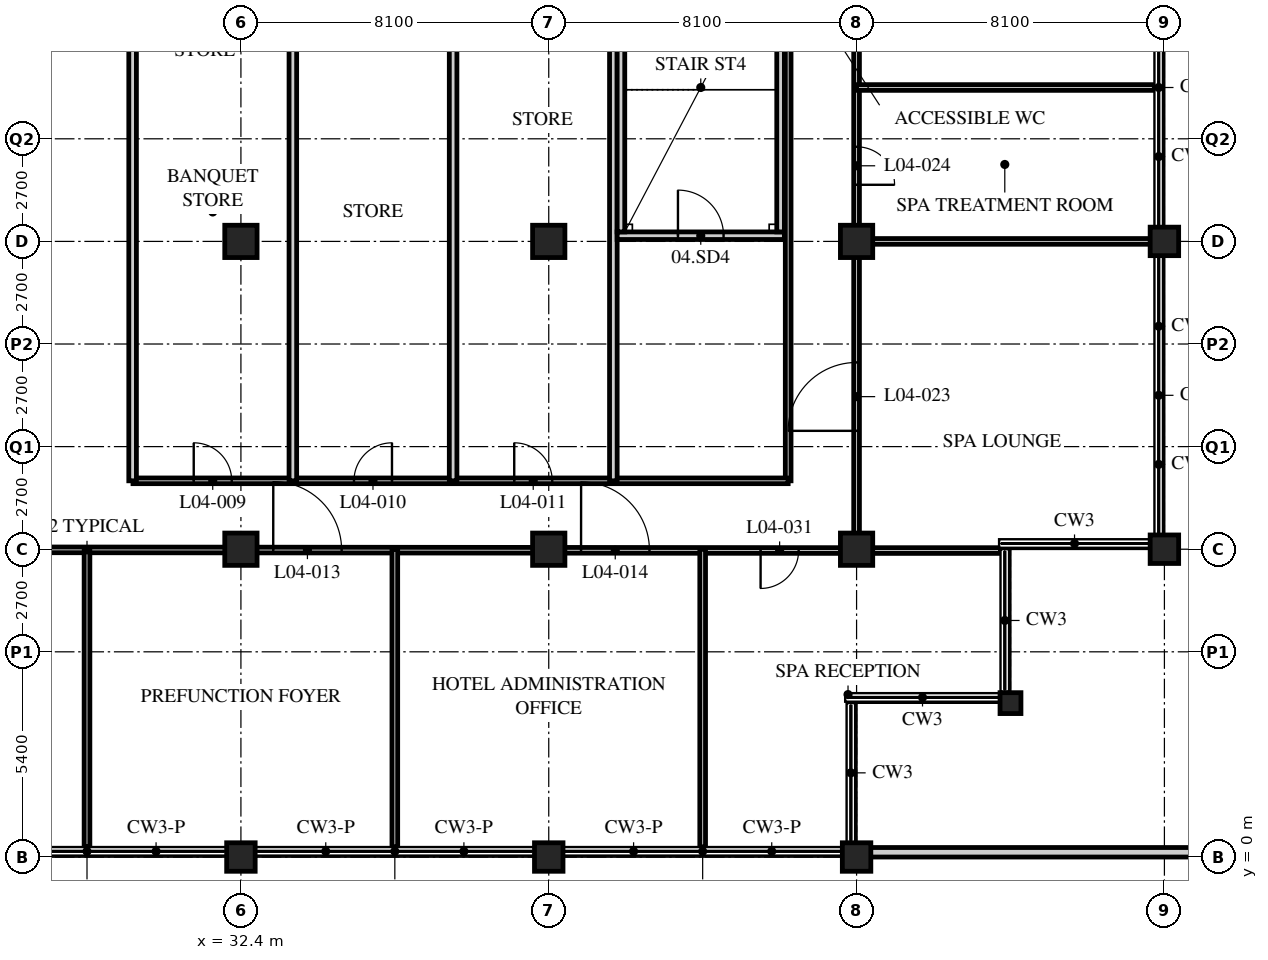
"""IFC4 building model, lengths in metres.
Left out: names, types, materials, properties, quantities, classifications, styles, units other than length and angle.
Written with IfcOpenShell. Run it as: python <this file> out.ifc"""

import sys

from ifc_helpers import new_model, si_unit, direction, frame, frame_2d, origin, origin_2d, place, context, subcontext, project, spatial, rectangle, hollow_rectangle, extrude, element, fill, save


model = new_model("IFC4")
c1 = context("Model", 3, precision=1e-05, world=origin(), true_north=direction((0.0, 1.0)))
c2 = subcontext(c1, "Body", "Model", "MODEL_VIEW")
j1 = project(units=[si_unit("LENGTHUNIT", "METRE"), si_unit("PLANEANGLEUNIT", "RADIAN")], contexts=[c1])
p1 = place(None, origin())
s1 = spatial("IfcSite", under=j1, at=p1, CompositionType="ELEMENT")
p2 = place(p1, origin())
s2 = spatial("IfcBuilding", under=s1, at=p2, CompositionType="ELEMENT")
p3 = place(p2, frame((0.0, 0.0, 22.2)))
s3 = spatial("IfcBuildingStorey", under=s2, at=p3, CompositionType="ELEMENT", Elevation=22.2)
p4 = place(p3, frame((32.4, 0.0, 0.0), z_axis=(0.0, 0.0, 1.0), x_axis=(1.0, 0.0, 0.0)))
e1 = element("IfcColumn", 1, at=p4, inside=s3, PredefinedType="COLUMN", context=c2, shape_type="SweptSolid", body=[
    extrude(hollow_rectangle(XDim=0.75, YDim=0.75, WallThickness=0.07, at=origin_2d()), origin(), (0.0, 0.0, 1.0), 5.4),
])
for number, where, z_axis, x_axis in (
    (2, (32.4, 8.1, 0.0), (0.0, 0.0, 1.0), (1.0, 0.0, 0.0)),
    (3, (32.4, 16.2, 0.0), (0.0, 0.0, 1.0), (1.0, 0.0, 0.0)),
):
    element("IfcColumn", number, at=place(p3, frame(where, z_axis=z_axis, x_axis=x_axis)), inside=s3, PredefinedType="COLUMN", context=c2, shape_type="SweptSolid", body=[
        extrude(hollow_rectangle(XDim=0.85, YDim=0.85, WallThickness=0.085, at=origin_2d()), origin(), (0.0, 0.0, 1.0), 5.4),
    ])
p5 = place(p3, frame((40.5, 0.0, 0.0), z_axis=(0.0, 0.0, 1.0), x_axis=(1.0, 0.0, 0.0)))
e4 = element("IfcColumn", 4, at=p5, inside=s3, PredefinedType="COLUMN", context=c2, shape_type="SweptSolid", body=[
    extrude(hollow_rectangle(XDim=0.75, YDim=0.75, WallThickness=0.07, at=origin_2d()), origin(), (0.0, 0.0, 1.0), 5.4),
])
for number, where, z_axis, x_axis in (
    (5, (40.5, 8.1, 0.0), (0.0, 0.0, 1.0), (1.0, 0.0, 0.0)),
    (6, (40.5, 16.2, 0.0), (0.0, 0.0, 1.0), (1.0, 0.0, 0.0)),
):
    element("IfcColumn", number, at=place(p3, frame(where, z_axis=z_axis, x_axis=x_axis)), inside=s3, PredefinedType="COLUMN", context=c2, shape_type="SweptSolid", body=[
        extrude(hollow_rectangle(XDim=0.85, YDim=0.85, WallThickness=0.085, at=origin_2d()), origin(), (0.0, 0.0, 1.0), 5.4),
    ])
p6 = place(p3, frame((48.6, 0.0, 0.0), z_axis=(0.0, 0.0, 1.0), x_axis=(1.0, 0.0, 0.0)))
e7 = element("IfcColumn", 7, at=p6, inside=s3, PredefinedType="COLUMN", context=c2, shape_type="SweptSolid", body=[
    extrude(hollow_rectangle(XDim=0.75, YDim=0.75, WallThickness=0.07, at=origin_2d()), origin(), (0.0, 0.0, 1.0), 5.4),
])
for number, where, z_axis, x_axis in (
    (8, (48.6, 8.1, 0.0), (0.0, 0.0, 1.0), (1.0, 0.0, 0.0)),
    (9, (48.6, 16.2, 0.0), (0.0, 0.0, 1.0), (1.0, 0.0, 0.0)),
):
    element("IfcColumn", number, at=place(p3, frame(where, z_axis=z_axis, x_axis=x_axis)), inside=s3, PredefinedType="COLUMN", context=c2, shape_type="SweptSolid", body=[
        extrude(hollow_rectangle(XDim=0.85, YDim=0.85, WallThickness=0.085, at=origin_2d()), origin(), (0.0, 0.0, 1.0), 5.4),
    ])
p7 = place(p3, frame((52.65, 4.05, 0.0), z_axis=(0.0, 0.0, 1.0), x_axis=(1.0, 0.0, 0.0)))
e10 = element("IfcColumn", 10, at=p7, inside=s3, PredefinedType="COLUMN", context=c2, shape_type="SweptSolid", body=[
    extrude(hollow_rectangle(XDim=0.55, YDim=0.55, WallThickness=0.05, at=origin_2d()), origin(), (0.0, 0.0, 1.0), 5.4),
])
for number, where, z_axis, x_axis in (
    (11, (56.7, 8.1, 0.0), (0.0, 0.0, 1.0), (1.0, 0.0, 0.0)),
    (12, (56.7, 16.2, 0.0), (0.0, 0.0, 1.0), (1.0, 0.0, 0.0)),
):
    element("IfcColumn", number, at=place(p3, frame(where, z_axis=z_axis, x_axis=x_axis)), inside=s3, PredefinedType="COLUMN", context=c2, shape_type="SweptSolid", body=[
        extrude(hollow_rectangle(XDim=0.75, YDim=0.75, WallThickness=0.07, at=origin_2d()), origin(), (0.0, 0.0, 1.0), 5.4),
    ])
p8 = place(p3, frame((48.6, 0.125, 0.0), z_axis=(0.0, 0.0, 1.0), x_axis=(1.0, 0.0, 0.0)))
e13 = element("IfcWall", 13, at=p8, inside=s3, PredefinedType="PARAPET", context=c2, shape_type="SweptSolid", body=[
    extrude(rectangle(XDim=16.2, YDim=0.25, at=frame_2d((8.1, 0.0))), origin(), (0.0, 0.0, 1.0), 1.38),
])
p9 = place(p3, frame((8.1, 8.1, 0.0), z_axis=(0.0, 0.0, 1.0), x_axis=(0.99999962324, -0.000868055229, 0.0)))
e14 = element("IfcWall", 14, at=p9, inside=s3, PredefinedType="PARTITIONING", context=c2, shape_type="SweptSolid", body=[
    extrude(rectangle(XDim=40.5, YDim=0.15, at=frame_2d((20.25, 0.0))), origin(), (0.0, 0.0, 1.0), 4.428),
])
p10 = place(p9, frame((11.25, 0.0, 0.0)))
e15 = element("IfcOpeningElement", 15, at=p10, cuts=e14, PredefinedType="OPENING", context=c2, shape_type="SweptSolid", body=[
    extrude(rectangle(XDim=1.8, YDim=2.4, at=frame_2d((0.9, 1.2))), frame((0.0, 0.085, 0.0), z_axis=(0.0, -1.0, 0.0), x_axis=(1.0, 0.0, 0.0)), (0.0, 0.0, 1.0), 0.17),
])
p11 = place(p9, frame((25.15, 0.0, 0.0)))
e16 = element("IfcOpeningElement", 16, at=p11, cuts=e14, PredefinedType="OPENING", context=c2, shape_type="SweptSolid", body=[
    extrude(rectangle(XDim=1.8, YDim=2.4, at=frame_2d((0.9, 1.2))), frame((0.0, 0.085, 0.0), z_axis=(0.0, -1.0, 0.0), x_axis=(1.0, 0.0, 0.0)), (0.0, 0.0, 1.0), 0.17),
])
p12 = place(p9, frame((33.25, 0.0, 0.0)))
e17 = element("IfcOpeningElement", 17, at=p12, cuts=e14, PredefinedType="OPENING", context=c2, shape_type="SweptSolid", body=[
    extrude(rectangle(XDim=1.8, YDim=2.4, at=frame_2d((0.9, 1.2))), frame((0.0, 0.085, 0.0), z_axis=(0.0, -1.0, 0.0), x_axis=(1.0, 0.0, 0.0)), (0.0, 0.0, 1.0), 0.17),
])
p13 = place(p9, frame((1.525, 0.0, 0.0)))
e18 = element("IfcOpeningElement", 18, at=p13, cuts=e14, PredefinedType="OPENING", context=c2, shape_type="SweptSolid", body=[
    extrude(rectangle(XDim=1.0, YDim=2.1, at=frame_2d((0.5, 1.05))), frame((0.0, 0.085, 0.0), z_axis=(0.0, -1.0, 0.0), x_axis=(1.0, 0.0, 0.0)), (0.0, 0.0, 1.0), 0.17),
])
p14 = place(p9, frame((37.975, 0.0, 0.0)))
e19 = element("IfcOpeningElement", 19, at=p14, cuts=e14, PredefinedType="OPENING", context=c2, shape_type="SweptSolid", body=[
    extrude(rectangle(XDim=1.0, YDim=2.1, at=frame_2d((0.5, 1.05))), frame((0.0, 0.085, 0.0), z_axis=(0.0, -1.0, 0.0), x_axis=(1.0, 0.0, 0.0)), (0.0, 0.0, 1.0), 0.17),
])
p15 = place(p3, frame((48.6, 8.065, 0.0), z_axis=(0.0, 0.0, 1.0), x_axis=(0.0, 1.0, 0.0)))
e20 = element("IfcWall", 20, at=p15, inside=s3, PredefinedType="PARTITIONING", context=c2, shape_type="SweptSolid", body=[
    extrude(rectangle(XDim=34.385, YDim=0.15, at=frame_2d((17.192, 0.0))), origin(), (0.0, 0.0, 1.0), 4.428),
])
p16 = place(p15, frame((3.15, 0.0, 0.0)))
e21 = element("IfcOpeningElement", 21, at=p16, cuts=e20, PredefinedType="OPENING", context=c2, shape_type="SweptSolid", body=[
    extrude(rectangle(XDim=1.8, YDim=2.4, at=frame_2d((0.9, 1.2))), frame((0.0, 0.085, 0.0), z_axis=(0.0, -1.0, 0.0), x_axis=(1.0, 0.0, 0.0)), (0.0, 0.0, 1.0), 0.17),
])
p17 = place(p15, frame((9.625, 0.0, 0.0)))
e22 = element("IfcOpeningElement", 22, at=p17, cuts=e20, PredefinedType="OPENING", context=c2, shape_type="SweptSolid", body=[
    extrude(rectangle(XDim=1.0, YDim=2.1, at=frame_2d((0.5, 1.05))), frame((0.0, 0.085, 0.0), z_axis=(0.0, -1.0, 0.0), x_axis=(1.0, 0.0, 0.0)), (0.0, 0.0, 1.0), 0.17),
])
p18 = place(p15, frame((13.675, 0.0, 0.0)))
e23 = element("IfcOpeningElement", 23, at=p18, cuts=e20, PredefinedType="OPENING", context=c2, shape_type="SweptSolid", body=[
    extrude(rectangle(XDim=1.0, YDim=2.1, at=frame_2d((0.5, 1.05))), frame((0.0, 0.085, 0.0), z_axis=(0.0, -1.0, 0.0), x_axis=(1.0, 0.0, 0.0)), (0.0, 0.0, 1.0), 0.17),
])
p19 = place(p15, frame((17.725, 0.0, 0.0)))
e24 = element("IfcOpeningElement", 24, at=p19, cuts=e20, PredefinedType="OPENING", context=c2, shape_type="SweptSolid", body=[
    extrude(rectangle(XDim=1.0, YDim=2.1, at=frame_2d((0.5, 1.05))), frame((0.0, 0.085, 0.0), z_axis=(0.0, -1.0, 0.0), x_axis=(1.0, 0.0, 0.0)), (0.0, 0.0, 1.0), 0.17),
])
p20 = place(p15, frame((21.775, 0.0, 0.0)))
e25 = element("IfcOpeningElement", 25, at=p20, cuts=e20, PredefinedType="OPENING", context=c2, shape_type="SweptSolid", body=[
    extrude(rectangle(XDim=1.0, YDim=2.1, at=frame_2d((0.5, 1.05))), frame((0.0, 0.085, 0.0), z_axis=(0.0, -1.0, 0.0), x_axis=(1.0, 0.0, 0.0)), (0.0, 0.0, 1.0), 0.17),
])
p21 = place(p15, frame((25.825, 0.0, 0.0)))
e26 = element("IfcOpeningElement", 26, at=p21, cuts=e20, PredefinedType="OPENING", context=c2, shape_type="SweptSolid", body=[
    extrude(rectangle(XDim=1.0, YDim=2.1, at=frame_2d((0.5, 1.05))), frame((0.0, 0.085, 0.0), z_axis=(0.0, -1.0, 0.0), x_axis=(1.0, 0.0, 0.0)), (0.0, 0.0, 1.0), 0.17),
])
p22 = place(p15, frame((30.6, 0.0, 0.0)))
e27 = element("IfcOpeningElement", 27, at=p22, cuts=e20, PredefinedType="OPENING", context=c2, shape_type="SweptSolid", body=[
    extrude(rectangle(XDim=1.0, YDim=2.1, at=frame_2d((0.5, 1.05))), frame((0.0, 0.085, 0.0), z_axis=(0.0, -1.0, 0.0), x_axis=(1.0, 0.0, 0.0)), (0.0, 0.0, 1.0), 0.17),
])
p23 = place(p3, frame((46.8, 9.9, 0.0), z_axis=(0.0, 0.0, 1.0), x_axis=(0.0, 1.0, 0.0)))
e28 = element("IfcWall", 28, at=p23, inside=s3, PredefinedType="PARTITIONING", context=c2, shape_type="SweptSolid", body=[
    extrude(rectangle(XDim=30.75, YDim=0.15, at=frame_2d((15.375, 0.0))), origin(), (0.0, 0.0, 1.0), 5.19),
])
p24 = place(p23, frame((15.175, 0.0, 0.0)))
e29 = element("IfcOpeningElement", 29, at=p24, cuts=e28, PredefinedType="OPENING", context=c2, shape_type="SweptSolid", body=[
    extrude(rectangle(XDim=0.85, YDim=2.1, at=frame_2d((0.425, 1.05))), frame((0.0, 0.085, 0.0), z_axis=(0.0, -1.0, 0.0), x_axis=(1.0, 0.0, 0.0)), (0.0, 0.0, 1.0), 0.17),
])
p25 = place(p23, frame((19.15, 0.0, 0.0)))
e30 = element("IfcOpeningElement", 30, at=p25, cuts=e28, PredefinedType="OPENING", context=c2, shape_type="SweptSolid", body=[
    extrude(rectangle(XDim=1.0, YDim=2.1, at=frame_2d((0.5, 1.05))), frame((0.0, 0.085, 0.0), z_axis=(0.0, -1.0, 0.0), x_axis=(1.0, 0.0, 0.0)), (0.0, 0.0, 1.0), 0.17),
])
p26 = place(p23, frame((26.05, 0.0, 0.0)))
e31 = element("IfcOpeningElement", 31, at=p26, cuts=e28, PredefinedType="OPENING", context=c2, shape_type="SweptSolid", body=[
    extrude(rectangle(XDim=1.0, YDim=2.1, at=frame_2d((0.5, 1.05))), frame((0.0, 0.085, 0.0), z_axis=(0.0, -1.0, 0.0), x_axis=(1.0, 0.0, 0.0)), (0.0, 0.0, 1.0), 0.17),
])
p27 = place(p3, frame((29.56, 9.9, 0.0), z_axis=(0.0, 0.0, 1.0), x_axis=(1.0, 0.0, 0.0)))
e32 = element("IfcWall", 32, at=p27, inside=s3, PredefinedType="PARTITIONING", context=c2, shape_type="SweptSolid", body=[
    extrude(rectangle(XDim=17.24, YDim=0.15, at=frame_2d((8.62, 0.0))), origin(), (0.0, 0.0, 1.0), 5.19),
])
p28 = place(p27, frame((1.598, 0.0, 0.0)))
e33 = element("IfcOpeningElement", 33, at=p28, cuts=e32, PredefinedType="OPENING", context=c2, shape_type="SweptSolid", body=[
    extrude(rectangle(XDim=1.0, YDim=2.1, at=frame_2d((0.5, 1.05))), frame((0.0, 0.085, 0.0), z_axis=(0.0, -1.0, 0.0), x_axis=(1.0, 0.0, 0.0)), (0.0, 0.0, 1.0), 0.17),
])
p29 = place(p27, frame((5.815, 0.0, 0.0)))
e34 = element("IfcOpeningElement", 34, at=p29, cuts=e32, PredefinedType="OPENING", context=c2, shape_type="SweptSolid", body=[
    extrude(rectangle(XDim=1.0, YDim=2.1, at=frame_2d((0.5, 1.05))), frame((0.0, 0.085, 0.0), z_axis=(0.0, -1.0, 0.0), x_axis=(1.0, 0.0, 0.0)), (0.0, 0.0, 1.0), 0.17),
])
p30 = place(p27, frame((10.032, 0.0, 0.0)))
e35 = element("IfcOpeningElement", 35, at=p30, cuts=e32, PredefinedType="OPENING", context=c2, shape_type="SweptSolid", body=[
    extrude(rectangle(XDim=1.0, YDim=2.1, at=frame_2d((0.5, 1.05))), frame((0.0, 0.085, 0.0), z_axis=(0.0, -1.0, 0.0), x_axis=(1.0, 0.0, 0.0)), (0.0, 0.0, 1.0), 0.17),
])
for number, where, z_axis, x_axis in (
    (36, (33.767, 9.9, 0.0), (0.0, 0.0, 1.0), (0.0, 1.0, 0.0)),
    (37, (37.983, 9.9, 0.0), (0.0, 0.0, 1.0), (0.0, 1.0, 0.0)),
    (38, (42.2, 9.9, 0.0), (0.0, 0.0, 1.0), (0.0, 1.0, 0.0)),
    (39, (29.55, 9.9, 0.0), (0.0, 0.0, 1.0), (0.0, 1.0, 0.0)),
):
    element("IfcWall", number, at=place(p3, frame(where, z_axis=z_axis, x_axis=x_axis)), inside=s3, PredefinedType="SOLIDWALL", context=c2, shape_type="SweptSolid", body=[
        extrude(rectangle(XDim=14.4, YDim=0.2, at=frame_2d((7.2, 0.0))), origin(), (0.0, 0.0, 1.0), 5.19),
    ])
for number, where, z_axis, x_axis in (
    (40, (28.35, 8.1, 0.0), (0.0, 0.0, 1.0), (0.0, -1.0, 0.0)),
    (41, (36.45, 8.1, 0.0), (0.0, 0.0, 1.0), (0.0, -1.0, 0.0)),
):
    element("IfcWall", number, at=place(p3, frame(where, z_axis=z_axis, x_axis=x_axis)), inside=s3, PredefinedType="PARTITIONING", context=c2, shape_type="SweptSolid", body=[
        extrude(rectangle(XDim=7.835, YDim=0.15, at=frame_2d((3.917, 0.0))), origin(), (0.0, 0.0, 1.0), 5.19),
    ])
p31 = place(p3, frame((48.6, 16.2, 0.0), z_axis=(0.0, 0.0, 1.0), x_axis=(1.0, 0.0, 0.0)))
e42 = element("IfcWall", 42, at=p31, inside=s3, PredefinedType="PARTITIONING", context=c2, shape_type="SweptSolid", body=[
    extrude(rectangle(XDim=7.8, YDim=0.15, at=frame_2d((3.9, 0.0))), origin(), (0.0, 0.0, 1.0), 4.428),
])
p32 = place(p3, frame((48.6, 20.25, 0.0), z_axis=(0.0, 0.0, 1.0), x_axis=(1.0, 0.0, 0.0)))
e43 = element("IfcWall", 43, at=p32, inside=s3, PredefinedType="PARTITIONING", context=c2, shape_type="SweptSolid", body=[
    extrude(rectangle(XDim=7.834, YDim=0.15, at=frame_2d((3.917, 0.0))), origin(), (0.0, 0.0, 1.0), 5.19),
])
p33 = place(p3, frame((48.6, 8.065, 0.0), z_axis=(0.0, 0.0, 1.0), x_axis=(1.0, 0.0, 0.0)))
e44 = element("IfcWall", 44, at=p33, inside=s3, PredefinedType="PARTITIONING", context=c2, shape_type="SweptSolid", body=[
    extrude(rectangle(XDim=3.784, YDim=0.15, at=frame_2d((1.892, 0.0))), origin(), (0.0, 0.0, 1.0), 4.428),
])
p34 = place(p3, frame((44.55, 8.1, 0.0), z_axis=(0.0, 0.0, 1.0), x_axis=(0.0, -1.0, 0.0)))
e45 = element("IfcWall", 45, at=p34, inside=s3, PredefinedType="PARTITIONING", context=c2, shape_type="SweptSolid", body=[
    extrude(rectangle(XDim=7.835, YDim=0.15, at=frame_2d((3.917, 0.0))), origin(), (0.0, 0.0, 1.0), 5.19),
])
p35 = place(p3, frame((42.3, 16.35, 0.0), z_axis=(0.0, 0.0, 1.0), x_axis=(1.0, 0.0, 0.0)))
e46 = element("IfcWall", 46, at=p35, inside=s3, PredefinedType="SOLIDWALL", context=c2, shape_type="SweptSolid", body=[
    extrude(rectangle(XDim=4.4, YDim=0.2, at=frame_2d((2.2, 0.0))), origin(), (0.0, 0.0, 1.0), 4.428),
])
p36 = place(p35, frame((1.6, 0.0, 0.0)))
e47 = element("IfcOpeningElement", 47, at=p36, cuts=e46, PredefinedType="OPENING", context=c2, shape_type="SweptSolid", body=[
    extrude(rectangle(XDim=1.2, YDim=2.1, at=frame_2d((0.6, 1.05))), frame((0.0, 0.11, 0.0), z_axis=(0.0, -1.0, 0.0), x_axis=(1.0, 0.0, 0.0)), (0.0, 0.0, 1.0), 0.22),
])
for number, where, z_axis, x_axis in (
    (48, (42.4, 16.45, 0.0), (0.0, 0.0, 1.0), (0.0, 1.0, 0.0)),
    (49, (46.6, 16.45, 0.0), (0.0, 0.0, 1.0), (0.0, 1.0, 0.0)),
):
    element("IfcWall", number, at=place(p3, frame(where, z_axis=z_axis, x_axis=x_axis)), inside=s3, PredefinedType="SOLIDWALL", context=c2, shape_type="SweptSolid", body=[
        extrude(rectangle(XDim=7.6, YDim=0.2, at=frame_2d((3.8, 0.0))), origin(), (0.0, 0.0, 1.0), 5.19),
    ])
p37 = place(p28, origin())
e50 = element("IfcDoor", 50, at=p37, inside=s3, OperationType="SINGLE_SWING_LEFT", PredefinedType="DOOR", context=c2, shape_type="SweptSolid", body=[
    extrude(rectangle(XDim=1.0, YDim=2.1, at=frame_2d((0.5, 1.05))), frame((0.0, 0.025, 0.0), z_axis=(0.0, -1.0, 0.0), x_axis=(1.0, 0.0, 0.0)), (0.0, 0.0, 1.0), 0.05),
])
fill(e33, e50)
p38 = place(p29, origin())
e51 = element("IfcDoor", 51, at=p38, inside=s3, OperationType="SINGLE_SWING_RIGHT", PredefinedType="DOOR", context=c2, shape_type="SweptSolid", body=[
    extrude(rectangle(XDim=1.0, YDim=2.1, at=frame_2d((0.5, 1.05))), frame((0.0, 0.025, 0.0), z_axis=(0.0, -1.0, 0.0), x_axis=(1.0, 0.0, 0.0)), (0.0, 0.0, 1.0), 0.05),
])
fill(e34, e51)
p39 = place(p30, origin())
e52 = element("IfcDoor", 52, at=p39, inside=s3, OperationType="SINGLE_SWING_LEFT", PredefinedType="DOOR", context=c2, shape_type="SweptSolid", body=[
    extrude(rectangle(XDim=1.0, YDim=2.1, at=frame_2d((0.5, 1.05))), frame((0.0, 0.025, 0.0), z_axis=(0.0, -1.0, 0.0), x_axis=(1.0, 0.0, 0.0)), (0.0, 0.0, 1.0), 0.05),
])
fill(e35, e52)
p40 = place(p11, origin())
e53 = element("IfcDoor", 53, at=p40, inside=s3, OperationType="DOUBLE_DOOR_SINGLE_SWING", PredefinedType="DOOR", context=c2, shape_type="SweptSolid", body=[
    extrude(rectangle(XDim=1.8, YDim=2.4, at=frame_2d((0.9, 1.2))), frame((0.0, 0.025, 0.0), z_axis=(0.0, -1.0, 0.0), x_axis=(1.0, 0.0, 0.0)), (0.0, 0.0, 1.0), 0.05),
])
fill(e16, e53)
p41 = place(p12, origin())
e54 = element("IfcDoor", 54, at=p41, inside=s3, OperationType="DOUBLE_DOOR_SINGLE_SWING", PredefinedType="DOOR", context=c2, shape_type="SweptSolid", body=[
    extrude(rectangle(XDim=1.8, YDim=2.4, at=frame_2d((0.9, 1.2))), frame((0.0, 0.025, 0.0), z_axis=(0.0, -1.0, 0.0), x_axis=(1.0, 0.0, 0.0)), (0.0, 0.0, 1.0), 0.05),
])
fill(e17, e54)
p42 = place(p16, origin())
e55 = element("IfcDoor", 55, at=p42, inside=s3, OperationType="DOUBLE_DOOR_SINGLE_SWING", PredefinedType="DOOR", context=c2, shape_type="SweptSolid", body=[
    extrude(rectangle(XDim=1.8, YDim=2.4, at=frame_2d((0.9, 1.2))), frame((0.0, 0.025, 0.0), z_axis=(0.0, -1.0, 0.0), x_axis=(1.0, 0.0, 0.0)), (0.0, 0.0, 1.0), 0.05),
])
fill(e21, e55)
p43 = place(p17, origin())
e56 = element("IfcDoor", 56, at=p43, inside=s3, OperationType="SINGLE_SWING_RIGHT", PredefinedType="DOOR", context=c2, shape_type="SweptSolid", body=[
    extrude(rectangle(XDim=1.0, YDim=2.1, at=frame_2d((0.5, 1.05))), frame((0.0, 0.025, 0.0), z_axis=(0.0, -1.0, 0.0), x_axis=(1.0, 0.0, 0.0)), (0.0, 0.0, 1.0), 0.05),
])
fill(e22, e56)
p44 = place(p14, origin())
e57 = element("IfcDoor", 57, at=p44, inside=s3, OperationType="SINGLE_SWING_RIGHT", PredefinedType="DOOR", context=c2, shape_type="SweptSolid", body=[
    extrude(rectangle(XDim=1.0, YDim=2.1, at=frame_2d((0.5, 1.05))), frame((0.0, 0.025, 0.0), z_axis=(0.0, -1.0, 0.0), x_axis=(1.0, 0.0, 0.0)), (0.0, 0.0, 1.0), 0.05),
])
fill(e19, e57)
p45 = place(p36, origin())
e58 = element("IfcDoor", 58, at=p45, inside=s3, OperationType="SINGLE_SWING_LEFT", PredefinedType="DOOR", context=c2, shape_type="SweptSolid", body=[
    extrude(rectangle(XDim=1.2, YDim=2.1, at=frame_2d((0.6, 1.05))), frame((0.0, 0.025, 0.0), z_axis=(0.0, -1.0, 0.0), x_axis=(1.0, 0.0, 0.0)), (0.0, 0.0, 1.0), 0.05),
])
fill(e47, e58)
save(model, sys.argv[1])
